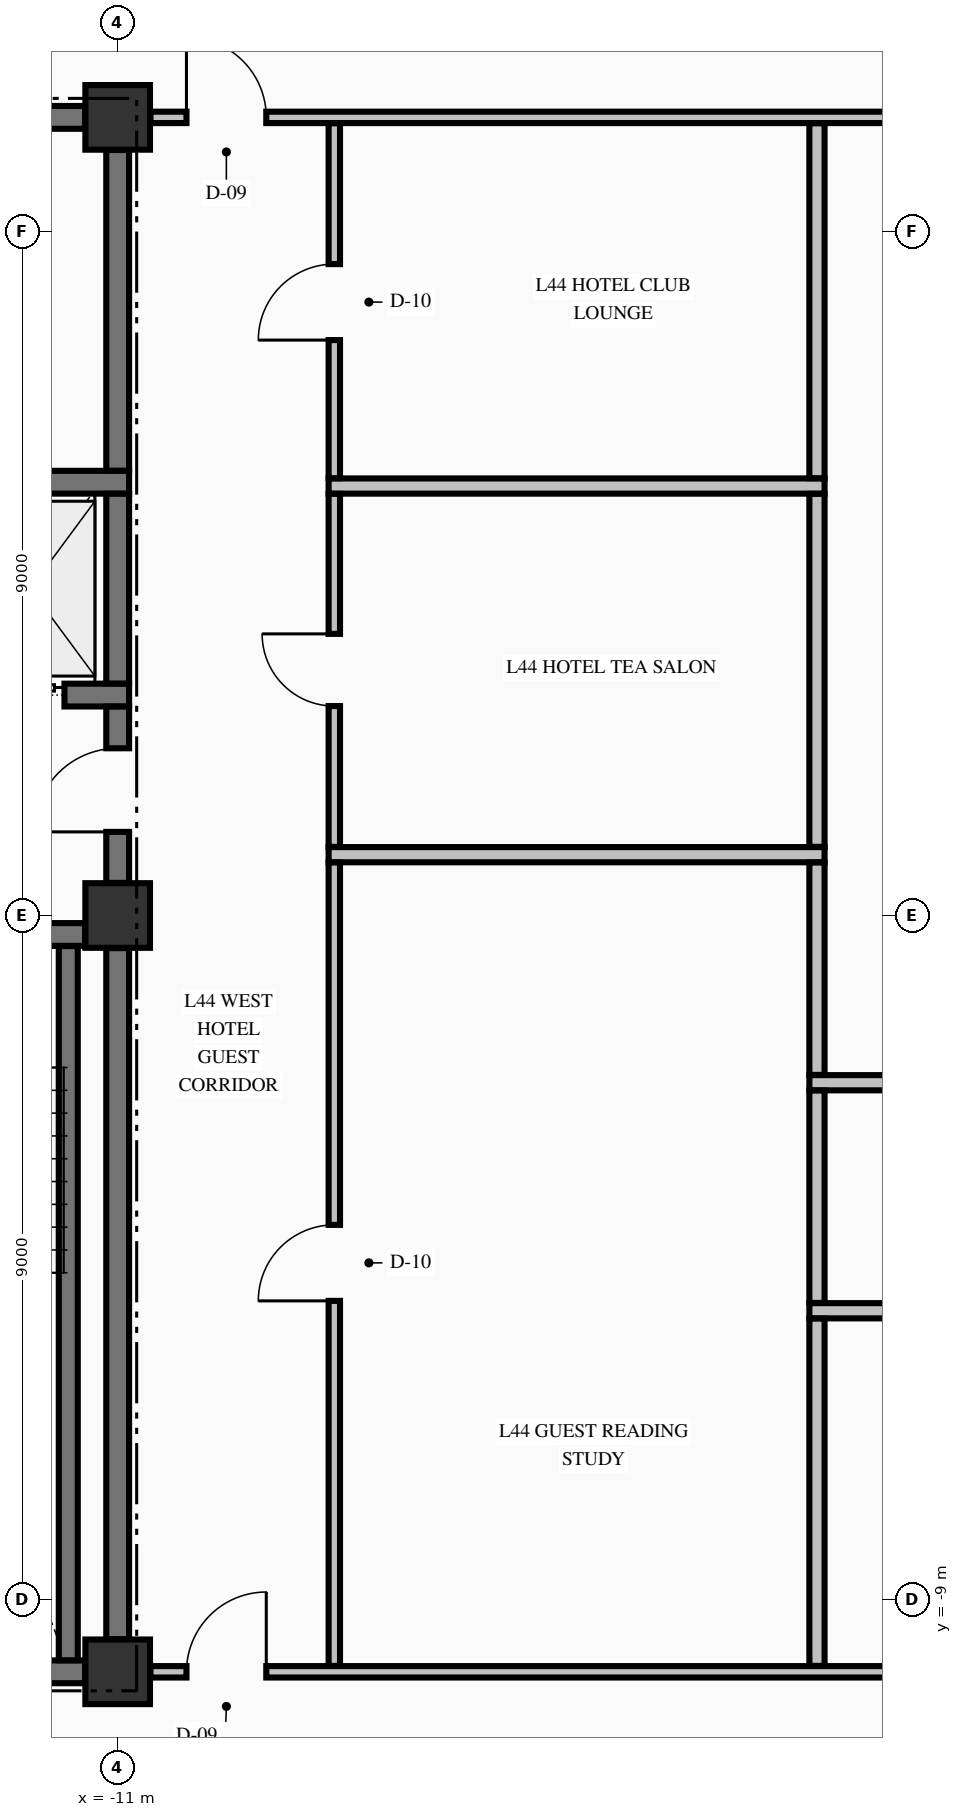
"""IFC4 building model, lengths in metres.
Left out: names, types, materials, properties, quantities, classifications, styles, units other than length and angle.
Written with IfcOpenShell. Run it as: python <this file> out.ifc"""

import sys

from ifc_helpers import new_model, si_unit, direction, frame, frame_2d, origin, origin_2d, place, context, subcontext, project, spatial, rectangle, extrude, element, fill, save


model = new_model("IFC4")
c1 = context("Model", 3, precision=1e-05, world=origin(), true_north=direction((0.0, 1.0)))
c2 = subcontext(c1, "Body", "Model", "MODEL_VIEW")
j1 = project(units=[si_unit("LENGTHUNIT", "METRE"), si_unit("PLANEANGLEUNIT", "RADIAN")], contexts=[c1])
p1 = place(None, origin())
s1 = spatial("IfcSite", under=j1, at=p1, CompositionType="ELEMENT")
p2 = place(p1, origin())
s2 = spatial("IfcBuilding", under=s1, at=p2, CompositionType="ELEMENT")
p3 = place(p2, frame((0.0, 0.0, 172.86)))
s3 = spatial("IfcBuildingStorey", under=s2, at=p3, CompositionType="ELEMENT", Elevation=172.86)
for number, where, z_axis, x_axis in (
    (1, (-11.0, -9.95, -0.25), (0.0, 0.0, 1.0), (1.0, 0.0, 0.0)),
    (2, (-11.0, 0.0, -0.25), (0.0, 0.0, 1.0), (1.0, 0.0, 0.0)),
    (3, (-11.0, 10.5, -0.25), (0.0, 0.0, 1.0), (1.0, 0.0, 0.0)),
):
    element("IfcColumn", number, at=place(p3, frame(where, z_axis=z_axis, x_axis=x_axis)), inside=s3, PredefinedType="COLUMN", context=c2, shape_type="SweptSolid", body=[
        extrude(rectangle(XDim=0.85, YDim=0.85, at=origin_2d()), origin(), (0.0, 0.0, 1.0), 3.375),
    ])
p4 = place(p3, frame((-14.7, -9.95, 0.0), z_axis=(0.0, 0.0, 1.0), x_axis=(1.0, 0.0, 0.0)))
e4 = element("IfcWall", 4, at=p4, inside=s3, PredefinedType="SHEAR", context=c2, shape_type="SweptSolid", body=[
    extrude(rectangle(XDim=3.271, YDim=0.3, at=frame_2d((1.635, 0.0))), origin(), (0.0, 0.0, 1.0), 3.125),
])
p5 = place(p3, frame((-19.571, -0.25, 0.0), z_axis=(0.0, 0.0, 1.0), x_axis=(1.0, 0.0, 0.0)))
e5 = element("IfcWall", 5, at=p5, inside=s3, PredefinedType="SHEAR", context=c2, shape_type="SweptSolid", body=[
    extrude(rectangle(XDim=8.142, YDim=0.3, at=frame_2d((4.071, 0.0))), origin(), (0.0, 0.0, 1.0), 3.125),
])
p6 = place(p5, frame((5.871, 0.0, 0.0)))
e6 = element("IfcOpeningElement", 6, at=p6, cuts=e5, PredefinedType="OPENING", context=c2, shape_type="SweptSolid", body=[
    extrude(rectangle(XDim=1.1, YDim=2.15, at=frame_2d((0.55, 1.075))), frame((0.0, 0.16, 0.0), z_axis=(0.0, -1.0, 0.0), x_axis=(1.0, 0.0, 0.0)), (0.0, 0.0, 1.0), 0.32),
])
p7 = place(p3, frame((-14.875, 2.9, 0.0), z_axis=(0.0, 0.0, 1.0), x_axis=(1.0, 0.0, 0.0)))
e7 = element("IfcWall", 7, at=p7, inside=s3, PredefinedType="SHEAR", context=c2, shape_type="SweptSolid", body=[
    extrude(rectangle(XDim=4.025, YDim=0.3, at=frame_2d((2.012, 0.0))), origin(), (0.0, 0.0, 1.0), 3.125),
])
p8 = place(p7, frame((2.075, 0.0, 0.0)))
e8 = element("IfcOpeningElement", 8, at=p8, cuts=e7, PredefinedType="OPENING", context=c2, shape_type="SweptSolid", body=[
    extrude(rectangle(XDim=1.1, YDim=2.2, at=frame_2d((0.55, 1.1))), frame((0.0, 0.16, 0.0), z_axis=(0.0, -1.0, 0.0), x_axis=(1.0, 0.0, 0.0)), (0.0, 0.0, 1.0), 0.32),
])
p9 = place(p3, frame((-14.875, 5.7, 0.0), z_axis=(0.0, 0.0, 1.0), x_axis=(1.0, 0.0, 0.0)))
e9 = element("IfcWall", 9, at=p9, inside=s3, PredefinedType="SHEAR", context=c2, shape_type="SweptSolid", body=[
    extrude(rectangle(XDim=4.025, YDim=0.3, at=frame_2d((2.012, 0.0))), origin(), (0.0, 0.0, 1.0), 3.125),
])
p10 = place(p3, frame((-14.7, 10.5, 0.0), z_axis=(0.0, 0.0, 1.0), x_axis=(1.0, 0.0, 0.0)))
e10 = element("IfcWall", 10, at=p10, inside=s3, PredefinedType="SHEAR", context=c2, shape_type="SweptSolid", body=[
    extrude(rectangle(XDim=3.271, YDim=0.3, at=frame_2d((1.635, 0.0))), origin(), (0.0, 0.0, 1.0), 3.125),
])
p11 = place(p10, frame((0.775, 0.0, 0.0)))
e11 = element("IfcOpeningElement", 11, at=p11, cuts=e10, PredefinedType="OPENING", context=c2, shape_type="SweptSolid", body=[
    extrude(rectangle(XDim=0.95, YDim=2.15, at=frame_2d((0.475, 1.075))), frame((0.0, 0.16, 0.0), z_axis=(0.0, -1.0, 0.0), x_axis=(1.0, 0.0, 0.0)), (0.0, 0.0, 1.0), 0.32),
])
p12 = place(p3, frame((-10.569, -9.95, 0.0), z_axis=(0.0, 0.0, 1.0), x_axis=(1.0, 0.0, 0.0)))
e12 = element("IfcWall", 12, at=p12, inside=s3, PredefinedType="PARTITIONING", context=c2, shape_type="SweptSolid", body=[
    extrude(rectangle(XDim=21.138, YDim=0.15, at=frame_2d((10.569, 0.0))), origin(), (0.0, 0.0, 1.0), 3.125),
])
p13 = place(p12, frame((0.474, 0.0, 0.0)))
e13 = element("IfcOpeningElement", 13, at=p13, cuts=e12, PredefinedType="OPENING", context=c2, shape_type="SweptSolid", body=[
    extrude(rectangle(XDim=1.05, YDim=2.15, at=frame_2d((0.525, 1.075))), frame((0.0, 0.085, 0.0), z_axis=(0.0, -1.0, 0.0), x_axis=(1.0, 0.0, 0.0)), (0.0, 0.0, 1.0), 0.17),
])
p14 = place(p12, frame((19.614, 0.0, 0.0)))
e14 = element("IfcOpeningElement", 14, at=p14, cuts=e12, PredefinedType="OPENING", context=c2, shape_type="SweptSolid", body=[
    extrude(rectangle(XDim=1.05, YDim=2.15, at=frame_2d((0.525, 1.075))), frame((0.0, 0.085, 0.0), z_axis=(0.0, -1.0, 0.0), x_axis=(1.0, 0.0, 0.0)), (0.0, 0.0, 1.0), 0.17),
])
p15 = place(p12, frame((11.774, 0.0, 0.0)))
e15 = element("IfcOpeningElement", 15, at=p15, cuts=e12, PredefinedType="OPENING", context=c2, shape_type="SweptSolid", body=[
    extrude(rectangle(XDim=0.95, YDim=2.15, at=frame_2d((0.475, 1.075))), frame((0.0, 0.085, 0.0), z_axis=(0.0, -1.0, 0.0), x_axis=(1.0, 0.0, 0.0)), (0.0, 0.0, 1.0), 0.17),
])
for number, where, z_axis, x_axis in (
    (16, (-1.9, -5.2, 0.0), (0.0, 0.0, 1.0), (1.0, 0.0, 0.0)),
    (17, (-1.9, -2.2, 0.0), (0.0, 0.0, 1.0), (1.0, 0.0, 0.0)),
):
    element("IfcWall", number, at=place(p3, frame(where, z_axis=z_axis, x_axis=x_axis)), inside=s3, PredefinedType="PARTITIONING", context=c2, shape_type="SweptSolid", body=[
        extrude(rectangle(XDim=10.125, YDim=0.2, at=frame_2d((5.062, 0.0))), origin(), (0.0, 0.0, 1.0), 3.125),
    ])
for number, where, z_axis, x_axis in (
    (18, (-8.225, 0.8, 0.0), (0.0, 0.0, 1.0), (1.0, 0.0, 0.0)),
    (19, (-8.225, 5.65, 0.0), (0.0, 0.0, 1.0), (1.0, 0.0, 0.0)),
):
    element("IfcWall", number, at=place(p3, frame(where, z_axis=z_axis, x_axis=x_axis)), inside=s3, PredefinedType="PARTITIONING", context=c2, shape_type="SweptSolid", body=[
        extrude(rectangle(XDim=6.525, YDim=0.2, at=frame_2d((3.263, 0.0))), origin(), (0.0, 0.0, 1.0), 3.125),
    ])
p16 = place(p3, frame((-10.569, 10.5, 0.0), z_axis=(0.0, 0.0, 1.0), x_axis=(1.0, 0.0, 0.0)))
e20 = element("IfcWall", 20, at=p16, inside=s3, PredefinedType="PARTITIONING", context=c2, shape_type="SweptSolid", body=[
    extrude(rectangle(XDim=21.138, YDim=0.15, at=frame_2d((10.569, 0.0))), origin(), (0.0, 0.0, 1.0), 3.125),
])
p17 = place(p16, frame((0.474, 0.0, 0.0)))
e21 = element("IfcOpeningElement", 21, at=p17, cuts=e20, PredefinedType="OPENING", context=c2, shape_type="SweptSolid", body=[
    extrude(rectangle(XDim=1.05, YDim=2.15, at=frame_2d((0.525, 1.075))), frame((0.0, 0.085, 0.0), z_axis=(0.0, -1.0, 0.0), x_axis=(1.0, 0.0, 0.0)), (0.0, 0.0, 1.0), 0.17),
])
p18 = place(p16, frame((19.614, 0.0, 0.0)))
e22 = element("IfcOpeningElement", 22, at=p18, cuts=e20, PredefinedType="OPENING", context=c2, shape_type="SweptSolid", body=[
    extrude(rectangle(XDim=1.05, YDim=2.15, at=frame_2d((0.525, 1.075))), frame((0.0, 0.085, 0.0), z_axis=(0.0, -1.0, 0.0), x_axis=(1.0, 0.0, 0.0)), (0.0, 0.0, 1.0), 0.17),
])
p19 = place(p3, frame((-11.65, -9.798, 0.0), z_axis=(0.0, 0.0, 1.0), x_axis=(0.0, 1.0, 0.0)))
e23 = element("IfcWall", 23, at=p19, inside=s3, PredefinedType="SOLIDWALL", context=c2, shape_type="SweptSolid", body=[
    extrude(rectangle(XDim=9.396, YDim=0.25, at=frame_2d((4.698, 0.0))), origin(), (0.0, 0.0, 1.0), 3.125),
])
p20 = place(p3, frame((-11.0, -9.521, 0.0), z_axis=(0.0, 0.0, 1.0), x_axis=(0.0, 1.0, 0.0)))
e24 = element("IfcWall", 24, at=p20, inside=s3, PredefinedType="SHEAR", context=c2, shape_type="SweptSolid", body=[
    extrude(rectangle(XDim=9.092, YDim=0.3, at=frame_2d((4.546, 0.0))), origin(), (0.0, 0.0, 1.0), 3.125),
])
p21 = place(p3, frame((-11.0, 0.429, 0.0), z_axis=(0.0, 0.0, 1.0), x_axis=(0.0, 1.0, 0.0)))
e25 = element("IfcWall", 25, at=p21, inside=s3, PredefinedType="SHEAR", context=c2, shape_type="SweptSolid", body=[
    extrude(rectangle(XDim=2.319, YDim=0.3, at=frame_2d((1.16, 0.0))), origin(), (0.0, 0.0, 1.0), 3.125),
])
p22 = place(p21, frame((0.671, 0.0, 0.0)))
e26 = element("IfcOpeningElement", 26, at=p22, cuts=e25, PredefinedType="OPENING", context=c2, shape_type="SweptSolid", body=[
    extrude(rectangle(XDim=1.1, YDim=2.15, at=frame_2d((0.55, 1.075))), frame((0.0, 0.16, 0.0), z_axis=(0.0, -1.0, 0.0), x_axis=(1.0, 0.0, 0.0)), (0.0, 0.0, 1.0), 0.32),
])
p23 = place(p3, frame((-11.0, 3.052, 0.0), z_axis=(0.0, 0.0, 1.0), x_axis=(0.0, 1.0, 0.0)))
e27 = element("IfcWall", 27, at=p23, inside=s3, PredefinedType="SHEAR", context=c2, shape_type="SweptSolid", body=[
    extrude(rectangle(XDim=2.496, YDim=0.3, at=frame_2d((1.248, 0.0))), origin(), (0.0, 0.0, 1.0), 3.125),
])
p24 = place(p3, frame((-11.0, 5.852, 0.0), z_axis=(0.0, 0.0, 1.0), x_axis=(0.0, 1.0, 0.0)))
e28 = element("IfcWall", 28, at=p24, inside=s3, PredefinedType="SHEAR", context=c2, shape_type="SweptSolid", body=[
    extrude(rectangle(XDim=4.219, YDim=0.3, at=frame_2d((2.109, 0.0))), origin(), (0.0, 0.0, 1.0), 3.125),
])
p25 = place(p3, frame((-8.15, -9.872, 0.0), z_axis=(0.0, 0.0, 1.0), x_axis=(0.0, 1.0, 0.0)))
e29 = element("IfcWall", 29, at=p25, inside=s3, PredefinedType="PARTITIONING", context=c2, shape_type="SweptSolid", body=[
    extrude(rectangle(XDim=10.569, YDim=0.15, at=frame_2d((5.285, 0.0))), origin(), (0.0, 0.0, 1.0), 3.125),
])
p26 = place(p25, frame((4.802, 0.0, 0.0)))
e30 = element("IfcOpeningElement", 30, at=p26, cuts=e29, PredefinedType="OPENING", context=c2, shape_type="SweptSolid", body=[
    extrude(rectangle(XDim=1.0, YDim=2.15, at=frame_2d((0.5, 1.075))), frame((0.0, 0.085, 0.0), z_axis=(0.0, -1.0, 0.0), x_axis=(1.0, 0.0, 0.0)), (0.0, 0.0, 1.0), 0.17),
])
p27 = place(p3, frame((-8.15, 0.903, 0.0), z_axis=(0.0, 0.0, 1.0), x_axis=(0.0, 1.0, 0.0)))
e31 = element("IfcWall", 31, at=p27, inside=s3, PredefinedType="PARTITIONING", context=c2, shape_type="SweptSolid", body=[
    extrude(rectangle(XDim=4.644, YDim=0.15, at=frame_2d((2.322, 0.0))), origin(), (0.0, 0.0, 1.0), 3.125),
])
p28 = place(p27, frame((1.852, 0.0, 0.0)))
e32 = element("IfcOpeningElement", 32, at=p28, cuts=e31, PredefinedType="OPENING", context=c2, shape_type="SweptSolid", body=[
    extrude(rectangle(XDim=0.95, YDim=2.15, at=frame_2d((0.475, 1.075))), frame((0.0, 0.085, 0.0), z_axis=(0.0, -1.0, 0.0), x_axis=(1.0, 0.0, 0.0)), (0.0, 0.0, 1.0), 0.17),
])
p29 = place(p3, frame((-8.15, 5.753, 0.0), z_axis=(0.0, 0.0, 1.0), x_axis=(0.0, 1.0, 0.0)))
e33 = element("IfcWall", 33, at=p29, inside=s3, PredefinedType="PARTITIONING", context=c2, shape_type="SweptSolid", body=[
    extrude(rectangle(XDim=4.669, YDim=0.15, at=frame_2d((2.334, 0.0))), origin(), (0.0, 0.0, 1.0), 3.125),
])
p30 = place(p29, frame((1.817, 0.0, 0.0)))
e34 = element("IfcOpeningElement", 34, at=p30, cuts=e33, PredefinedType="OPENING", context=c2, shape_type="SweptSolid", body=[
    extrude(rectangle(XDim=1.0, YDim=2.15, at=frame_2d((0.5, 1.075))), frame((0.0, 0.085, 0.0), z_axis=(0.0, -1.0, 0.0), x_axis=(1.0, 0.0, 0.0)), (0.0, 0.0, 1.0), 0.17),
])
p31 = place(p3, frame((-1.8, -9.872, 0.0), z_axis=(0.0, 0.0, 1.0), x_axis=(0.0, 1.0, 0.0)))
e35 = element("IfcWall", 35, at=p31, inside=s3, PredefinedType="PARTITIONING", context=c2, shape_type="SweptSolid", body=[
    extrude(rectangle(XDim=4.569, YDim=0.2, at=frame_2d((2.285, 0.0))), origin(), (0.0, 0.0, 1.0), 3.125),
])
for number, where, z_axis, x_axis in (
    (36, (-1.8, -5.097, 0.0), (0.0, 0.0, 1.0), (0.0, 1.0, 0.0)),
    (37, (-1.8, -2.097, 0.0), (0.0, 0.0, 1.0), (0.0, 1.0, 0.0)),
):
    element("IfcWall", number, at=place(p3, frame(where, z_axis=z_axis, x_axis=x_axis)), inside=s3, PredefinedType="PARTITIONING", context=c2, shape_type="SweptSolid", body=[
        extrude(rectangle(XDim=2.794, YDim=0.2, at=frame_2d((1.397, 0.0))), origin(), (0.0, 0.0, 1.0), 3.125),
    ])
p32 = place(p3, frame((-1.8, 0.903, 0.0), z_axis=(0.0, 0.0, 1.0), x_axis=(0.0, 1.0, 0.0)))
e38 = element("IfcWall", 38, at=p32, inside=s3, PredefinedType="PARTITIONING", context=c2, shape_type="SweptSolid", body=[
    extrude(rectangle(XDim=4.644, YDim=0.2, at=frame_2d((2.322, 0.0))), origin(), (0.0, 0.0, 1.0), 3.125),
])
p33 = place(p3, frame((-1.8, 5.753, 0.0), z_axis=(0.0, 0.0, 1.0), x_axis=(0.0, 1.0, 0.0)))
e39 = element("IfcWall", 39, at=p33, inside=s3, PredefinedType="PARTITIONING", context=c2, shape_type="SweptSolid", body=[
    extrude(rectangle(XDim=4.669, YDim=0.2, at=frame_2d((2.334, 0.0))), origin(), (0.0, 0.0, 1.0), 3.125),
])
p34 = place(p22, origin())
e40 = element("IfcDoor", 40, at=p34, inside=s3, OperationType="SINGLE_SWING_LEFT", PredefinedType="DOOR", context=c2, shape_type="SweptSolid", body=[
    extrude(rectangle(XDim=1.1, YDim=2.15, at=frame_2d((0.55, 1.075))), frame((0.0, 0.025, 0.0), z_axis=(0.0, -1.0, 0.0), x_axis=(1.0, 0.0, 0.0)), (0.0, 0.0, 1.0), 0.05),
])
fill(e26, e40)
p35 = place(p8, origin())
e41 = element("IfcDoor", 41, at=p35, inside=s3, OperationType="SLIDING_TO_LEFT", PredefinedType="DOOR", context=c2, shape_type="SweptSolid", body=[
    extrude(rectangle(XDim=1.1, YDim=2.2, at=frame_2d((0.55, 1.1))), frame((0.0, 0.025, 0.0), z_axis=(0.0, -1.0, 0.0), x_axis=(1.0, 0.0, 0.0)), (0.0, 0.0, 1.0), 0.05),
])
fill(e8, e41)
p36 = place(p17, origin())
e42 = element("IfcDoor", 42, at=p36, inside=s3, OperationType="SINGLE_SWING_LEFT", PredefinedType="DOOR", context=c2, shape_type="SweptSolid", body=[
    extrude(rectangle(XDim=1.05, YDim=2.15, at=frame_2d((0.525, 1.075))), frame((0.0, 0.025, 0.0), z_axis=(0.0, -1.0, 0.0), x_axis=(1.0, 0.0, 0.0)), (0.0, 0.0, 1.0), 0.05),
])
fill(e21, e42)
p37 = place(p13, origin())
e43 = element("IfcDoor", 43, at=p37, inside=s3, OperationType="SINGLE_SWING_RIGHT", PredefinedType="DOOR", context=c2, shape_type="SweptSolid", body=[
    extrude(rectangle(XDim=1.05, YDim=2.15, at=frame_2d((0.525, 1.075))), frame((0.0, 0.025, 0.0), z_axis=(0.0, -1.0, 0.0), x_axis=(1.0, 0.0, 0.0)), (0.0, 0.0, 1.0), 0.05),
])
fill(e13, e43)
p38 = place(p30, origin())
e44 = element("IfcDoor", 44, at=p38, inside=s3, OperationType="SINGLE_SWING_LEFT", PredefinedType="DOOR", context=c2, shape_type="SweptSolid", body=[
    extrude(rectangle(XDim=1.0, YDim=2.15, at=frame_2d((0.5, 1.075))), frame((0.0, 0.025, 0.0), z_axis=(0.0, -1.0, 0.0), x_axis=(1.0, 0.0, 0.0)), (0.0, 0.0, 1.0), 0.05),
])
fill(e34, e44)
p39 = place(p28, origin())
e45 = element("IfcDoor", 45, at=p39, inside=s3, OperationType="SINGLE_SWING_RIGHT", PredefinedType="DOOR", context=c2, shape_type="SweptSolid", body=[
    extrude(rectangle(XDim=0.95, YDim=2.15, at=frame_2d((0.475, 1.075))), frame((0.0, 0.025, 0.0), z_axis=(0.0, -1.0, 0.0), x_axis=(1.0, 0.0, 0.0)), (0.0, 0.0, 1.0), 0.05),
])
fill(e32, e45)
p40 = place(p26, origin())
e46 = element("IfcDoor", 46, at=p40, inside=s3, OperationType="SINGLE_SWING_LEFT", PredefinedType="DOOR", context=c2, shape_type="SweptSolid", body=[
    extrude(rectangle(XDim=1.0, YDim=2.15, at=frame_2d((0.5, 1.075))), frame((0.0, 0.025, 0.0), z_axis=(0.0, -1.0, 0.0), x_axis=(1.0, 0.0, 0.0)), (0.0, 0.0, 1.0), 0.05),
])
fill(e30, e46)
save(model, sys.argv[1])
